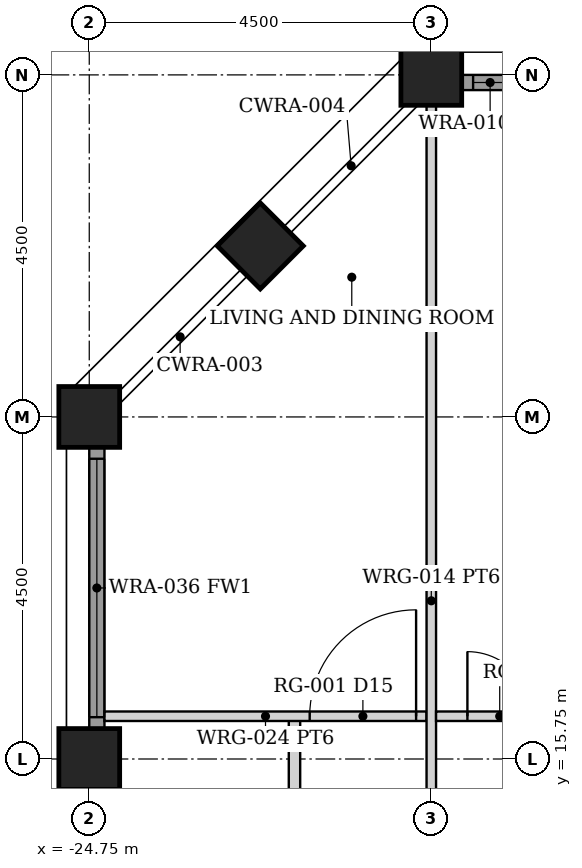
"""IFC4 building model, lengths in metres.
Left out: names, types, materials, properties, quantities, classifications, styles, units other than length and angle.
Written with IfcOpenShell. Run it as: python <this file> out.ifc"""

import sys

from ifc_helpers import new_model, si_unit, direction, frame, frame_2d, origin, origin_2d, place, context, subcontext, project, spatial, rectangle, hollow_rectangle, extrude, element, fill, save


model = new_model("IFC4")
c1 = context("Model", 3, precision=1e-05, world=origin(), true_north=direction((0.0, 1.0)))
c2 = subcontext(c1, "Body", "Model", "MODEL_VIEW")
j1 = project(units=[si_unit("LENGTHUNIT", "METRE"), si_unit("PLANEANGLEUNIT", "RADIAN")], contexts=[c1])
p1 = place(None, origin())
s1 = spatial("IfcSite", under=j1, at=p1, CompositionType="ELEMENT")
p2 = place(p1, origin())
s2 = spatial("IfcBuilding", under=s1, at=p2, CompositionType="ELEMENT")
p3 = place(p2, frame((0.0, 0.0, 89.5)))
s3 = spatial("IfcBuildingStorey", under=s2, at=p3, CompositionType="ELEMENT", Elevation=89.5)
for number, where, z_axis, x_axis in (
    (1, (-20.25, 24.75, 0.0), (0.0, 0.0, 1.0), (0.0, 1.0, 0.0)),
    (2, (-24.75, 15.75, 0.0), (0.0, 0.0, 1.0), (1.0, 0.0, 0.0)),
    (3, (-24.75, 20.25, 0.0), (0.0, 0.0, 1.0), (1.0, 0.0, 0.0)),
    (4, (-22.5, 22.5, 0.0), (0.0, 0.0, 1.0), (0.707, -0.707, 0.0)),
):
    element("IfcColumn", number, at=place(p3, frame(where, z_axis=z_axis, x_axis=x_axis)), inside=s3, PredefinedType="COLUMN", context=c2, shape_type="SweptSolid", body=[
        extrude(hollow_rectangle(XDim=0.8, YDim=0.8, WallThickness=0.06, at=origin_2d()), origin(), (0.0, 0.0, 1.0), 3.5),
    ])
p4 = place(p3, frame((-19.845, 24.65, 0.0), z_axis=(0.0, 0.0, 1.0), x_axis=(1.0, 0.0, 0.0)))
e5 = element("IfcWall", 5, at=p4, inside=s3, PredefinedType="SOLIDWALL", context=c2, shape_type="SweptSolid", body=[
    extrude(rectangle(XDim=3.69, YDim=0.2, at=frame_2d((1.845, 0.0))), origin(), (0.0, 0.0, 1.0), 2.379),
])
p5 = place(p4, frame((0.145, 0.0, 0.3)))
e6 = element("IfcOpeningElement", 6, at=p5, cuts=e5, PredefinedType="OPENING", context=c2, shape_type="SweptSolid", body=[
    extrude(rectangle(XDim=3.4, YDim=1.929, at=frame_2d((1.7, 0.964))), frame((0.0, 0.11, 0.0), z_axis=(0.0, -1.0, 0.0), x_axis=(1.0, 0.0, 0.0)), (0.0, 0.0, 1.0), 0.22),
])
p6 = place(p3, frame((-24.65, 16.155, 0.0), z_axis=(0.0, 0.0, 1.0), x_axis=(0.0, 1.0, 0.0)))
e7 = element("IfcWall", 7, at=p6, inside=s3, PredefinedType="SOLIDWALL", context=c2, shape_type="SweptSolid", body=[
    extrude(rectangle(XDim=3.69, YDim=0.2, at=frame_2d((1.845, 0.0))), origin(), (0.0, 0.0, 1.0), 2.379),
])
p7 = place(p6, frame((0.145, 0.0, 0.3)))
e8 = element("IfcOpeningElement", 8, at=p7, cuts=e7, PredefinedType="OPENING", context=c2, shape_type="SweptSolid", body=[
    extrude(rectangle(XDim=3.4, YDim=1.929, at=frame_2d((1.7, 0.964))), frame((0.0, 0.11, 0.0), z_axis=(0.0, -1.0, 0.0), x_axis=(1.0, 0.0, 0.0)), (0.0, 0.0, 1.0), 0.22),
])
p8 = place(p3, frame((-22.05, 11.312, 0.0), z_axis=(0.0, 0.0, 1.0), x_axis=(0.0, 1.0, 0.0)))
e9 = element("IfcWall", 9, at=p8, inside=s3, PredefinedType="PARTITIONING", context=c2, shape_type="SweptSolid", body=[
    extrude(rectangle(XDim=5.0, YDim=0.15, at=frame_2d((2.5, 0.0))), origin(), (0.0, 0.0, 1.0), 2.373),
])
p9 = place(p8, frame((2.05, 0.0, 0.0)))
e10 = element("IfcOpeningElement", 10, at=p9, cuts=e9, PredefinedType="OPENING", context=c2, shape_type="SweptSolid", body=[
    extrude(rectangle(XDim=0.9, YDim=2.1, at=frame_2d((0.45, 1.05))), frame((0.0, 0.085, 0.0), z_axis=(0.0, -1.0, 0.0), x_axis=(1.0, 0.0, 0.0)), (0.0, 0.0, 1.0), 0.17),
])
p10 = place(p3, frame((-24.55, 16.312, 0.0), z_axis=(0.0, 0.0, 1.0), x_axis=(1.0, 0.0, 0.0)))
e11 = element("IfcWall", 11, at=p10, inside=s3, PredefinedType="PARTITIONING", context=c2, shape_type="SweptSolid", body=[
    extrude(rectangle(XDim=4.238, YDim=0.125, at=frame_2d((2.119, 0.0))), origin(), (0.0, 0.0, 1.0), 2.373),
])
p11 = place(p10, frame((2.7, 0.0, 0.0)))
e12 = element("IfcOpeningElement", 12, at=p11, cuts=e11, PredefinedType="OPENING", context=c2, shape_type="SweptSolid", body=[
    extrude(rectangle(XDim=1.4, YDim=2.1, at=frame_2d((0.7, 1.05))), frame((0.0, 0.073, 0.0), z_axis=(0.0, -1.0, 0.0), x_axis=(1.0, 0.0, 0.0)), (0.0, 0.0, 1.0), 0.145),
])
p12 = place(p3, frame((-20.25, 11.312, 0.0), z_axis=(0.0, 0.0, 1.0), x_axis=(0.0, 1.0, 0.0)))
e13 = element("IfcWall", 13, at=p12, inside=s3, PredefinedType="PARTITIONING", context=c2, shape_type="SweptSolid", body=[
    extrude(rectangle(XDim=13.038, YDim=0.125, at=frame_2d((6.519, 0.0))), origin(), (0.0, 0.0, 1.0), 2.373),
])
p13 = place(p3, frame((-20.188, 16.312, 0.0), z_axis=(0.0, 0.0, 1.0), x_axis=(1.0, 0.0, 0.0)))
e14 = element("IfcWall", 14, at=p13, inside=s3, PredefinedType="PARTITIONING", context=c2, shape_type="SweptSolid", body=[
    extrude(rectangle(XDim=4.375, YDim=0.125, at=frame_2d((2.188, 0.0))), origin(), (0.0, 0.0, 1.0), 2.373),
])
p14 = place(p13, frame((0.413, 0.0, 0.0)))
e15 = element("IfcOpeningElement", 15, at=p14, cuts=e14, PredefinedType="OPENING", context=c2, shape_type="SweptSolid", body=[
    extrude(rectangle(XDim=0.85, YDim=2.1, at=frame_2d((0.425, 1.05))), frame((0.0, 0.073, 0.0), z_axis=(0.0, -1.0, 0.0), x_axis=(1.0, 0.0, 0.0)), (0.0, 0.0, 1.0), 0.145),
])
p15 = place(p13, frame((2.694, 0.0, 0.0)))
e16 = element("IfcOpeningElement", 16, at=p15, cuts=e14, PredefinedType="OPENING", context=c2, shape_type="SweptSolid", body=[
    extrude(rectangle(XDim=0.8, YDim=2.1, at=frame_2d((0.4, 1.05))), frame((0.0, 0.073, 0.0), z_axis=(0.0, -1.0, 0.0), x_axis=(1.0, 0.0, 0.0)), (0.0, 0.0, 1.0), 0.145),
])
p16 = place(p5, origin())
e17 = element("IfcWindow", 17, at=p16, inside=s3, PartitioningType="SINGLE_PANEL", PredefinedType="WINDOW", context=c2, shape_type="SweptSolid", body=[
    extrude(rectangle(XDim=3.4, YDim=1.929, at=frame_2d((1.7, 0.964))), frame((0.0, 0.03, 0.0), z_axis=(0.0, -1.0, 0.0), x_axis=(1.0, 0.0, 0.0)), (0.0, 0.0, 1.0), 0.06),
])
fill(e6, e17)
p17 = place(p7, origin())
e18 = element("IfcWindow", 18, at=p17, inside=s3, PartitioningType="SINGLE_PANEL", PredefinedType="WINDOW", context=c2, shape_type="SweptSolid", body=[
    extrude(rectangle(XDim=3.4, YDim=1.929, at=frame_2d((1.7, 0.964))), frame((0.0, 0.03, 0.0), z_axis=(0.0, -1.0, 0.0), x_axis=(1.0, 0.0, 0.0)), (0.0, 0.0, 1.0), 0.06),
])
fill(e8, e18)
p18 = place(p11, origin())
e19 = element("IfcDoor", 19, at=p18, inside=s3, OperationType="SINGLE_SWING_RIGHT", PredefinedType="DOOR", context=c2, shape_type="SweptSolid", body=[
    extrude(rectangle(XDim=1.4, YDim=2.1, at=frame_2d((0.7, 1.05))), frame((0.0, 0.025, 0.0), z_axis=(0.0, -1.0, 0.0), x_axis=(1.0, 0.0, 0.0)), (0.0, 0.0, 1.0), 0.05),
])
fill(e12, e19)
p19 = place(p14, origin())
e20 = element("IfcDoor", 20, at=p19, inside=s3, OperationType="SINGLE_SWING_LEFT", PredefinedType="DOOR", context=c2, shape_type="SweptSolid", body=[
    extrude(rectangle(XDim=0.85, YDim=2.1, at=frame_2d((0.425, 1.05))), frame((0.0, 0.025, 0.0), z_axis=(0.0, -1.0, 0.0), x_axis=(1.0, 0.0, 0.0)), (0.0, 0.0, 1.0), 0.05),
])
fill(e15, e20)
save(model, sys.argv[1])
